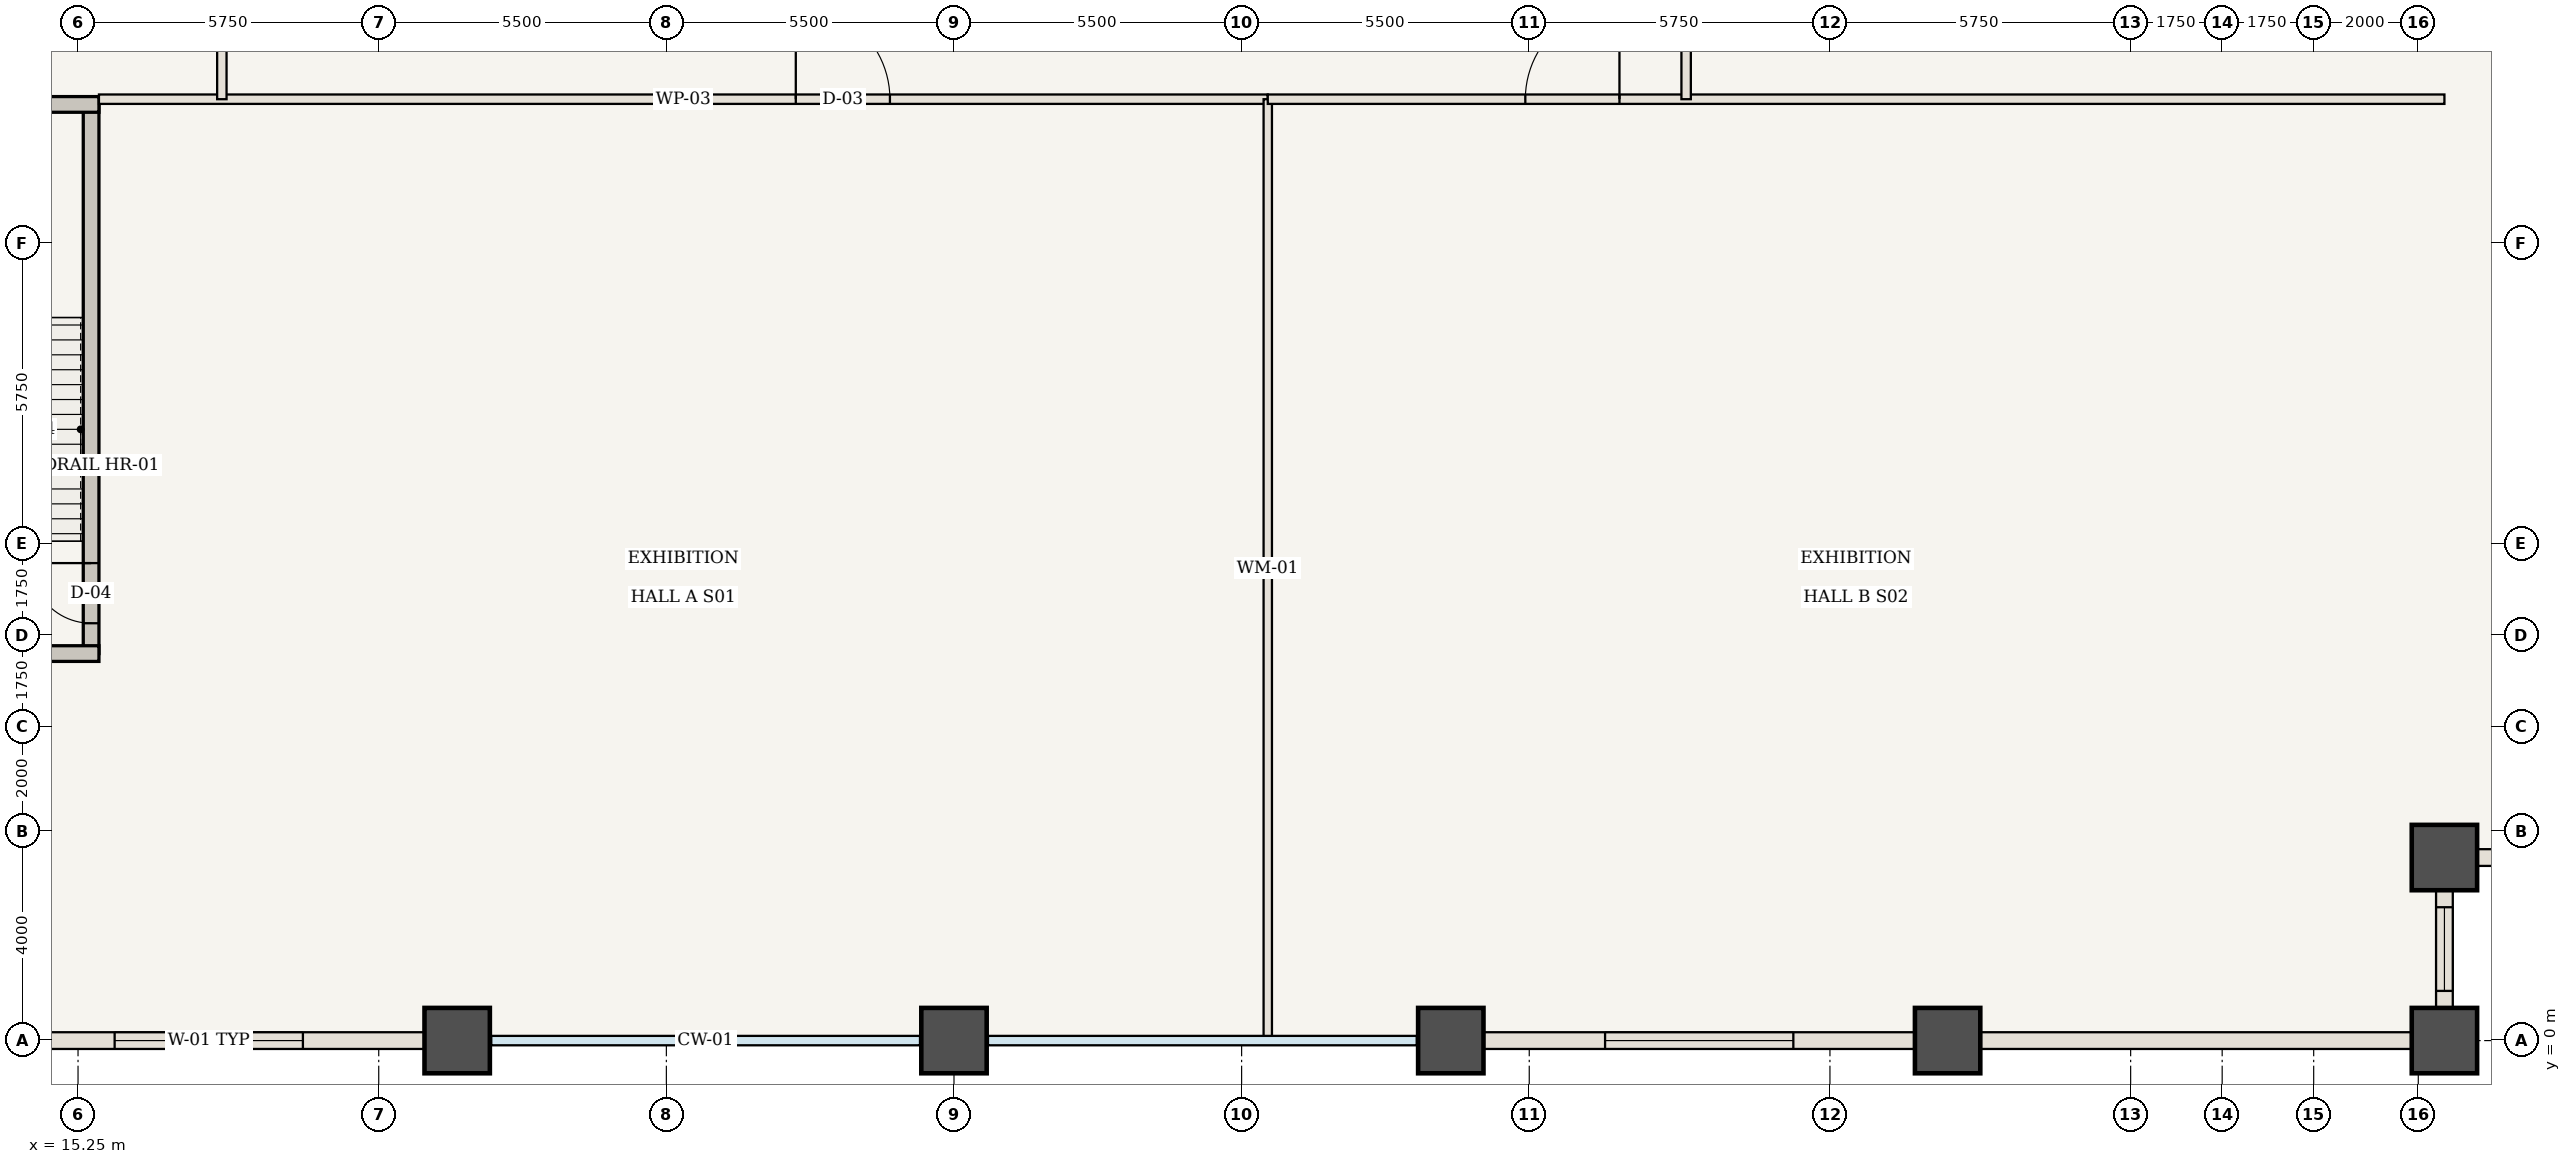
"""IFC4 building model, lengths in metres.
Left out: names, types, materials, properties, quantities, classifications, styles, units other than length and angle.
Written with IfcOpenShell. Run it as: python <this file> out.ifc"""

import sys

from ifc_helpers import new_model, si_unit, direction, frame, frame_2d, origin, origin_2d, place, context, subcontext, project, spatial, rectangle, extrude, element, fill, save


model = new_model("IFC4")
c1 = context("Model", 3, precision=1e-05, world=origin(), true_north=direction((0.0, 1.0)))
c2 = subcontext(c1, "Body", "Model", "MODEL_VIEW")
j1 = project(units=[si_unit("LENGTHUNIT", "METRE"), si_unit("PLANEANGLEUNIT", "RADIAN")], contexts=[c1])
p1 = place(None, origin())
s1 = spatial("IfcSite", under=j1, at=p1, CompositionType="ELEMENT")
p2 = place(p1, origin())
s2 = spatial("IfcBuilding", under=s1, at=p2, CompositionType="ELEMENT")
p3 = place(p2, frame((0.0, 0.0, 6.65)))
s3 = spatial("IfcBuildingStorey", under=s2, at=p3, CompositionType="ELEMENT", Elevation=6.65)
for number, where, z_axis, x_axis in (
    (1, (60.5, 0.0, 0.0), (0.0, 0.0, 1.0), (1.0, 0.0, 0.0)),
    (2, (60.5, 3.5, 0.0), (0.0, 0.0, 1.0), (1.0, 0.0, 0.0)),
    (3, (22.5, 0.0, 0.0), (0.0, 0.0, 1.0), (1.0, 0.0, 0.0)),
    (4, (32.0, 0.0, 0.0), (0.0, 0.0, 1.0), (1.0, 0.0, 0.0)),
    (5, (41.5, 0.0, 0.0), (0.0, 0.0, 1.0), (1.0, 0.0, 0.0)),
    (6, (51.0, 0.0, 0.0), (0.0, 0.0, 1.0), (1.0, 0.0, 0.0)),
):
    element("IfcColumn", number, at=place(p3, frame(where, z_axis=z_axis, x_axis=x_axis)), inside=s3, PredefinedType="COLUMN", context=c2, shape_type="SweptSolid", body=[
        extrude(rectangle(XDim=1.25, YDim=1.25, at=origin_2d()), origin(), (0.0, 0.0, 1.0), 5.6),
    ])
p4 = place(p3, frame((15.5, 7.4, 0.0), z_axis=(0.0, 0.0, 1.0), x_axis=(0.0, 1.0, 0.0)))
e7 = element("IfcWall", 7, at=p4, inside=s3, PredefinedType="SHEAR", context=c2, shape_type="SweptSolid", body=[
    extrude(rectangle(XDim=10.5, YDim=0.3, at=frame_2d((5.25, 0.0))), origin(), (0.0, 0.0, 1.0), 5.36),
])
p5 = place(p4, frame((0.58, 0.0, 0.0)))
e8 = element("IfcOpeningElement", 8, at=p5, cuts=e7, PredefinedType="OPENING", context=c2, shape_type="SweptSolid", body=[
    extrude(rectangle(XDim=1.15, YDim=2.15, at=frame_2d((0.575, 1.075))), frame((0.0, 0.16, 0.0), z_axis=(0.0, -1.0, 0.0), x_axis=(1.0, 0.0, 0.0)), (0.0, 0.0, 1.0), 0.32),
])
for number, where, z_axis, x_axis in (
    (9, (10.9, 7.4, 0.0), (0.0, 0.0, 1.0), (1.0, 0.0, 0.0)),
    (10, (10.9, 17.9, 0.0), (0.0, 0.0, 1.0), (1.0, 0.0, 0.0)),
):
    element("IfcWall", number, at=place(p3, frame(where, z_axis=z_axis, x_axis=x_axis)), inside=s3, PredefinedType="SHEAR", context=c2, shape_type="SweptSolid", body=[
        extrude(rectangle(XDim=4.75, YDim=0.3, at=frame_2d((2.375, 0.0))), origin(), (0.0, 0.0, 1.0), 5.36),
    ])
p6 = place(p3, frame((15.65, 18.0, 0.0), z_axis=(0.0, 0.0, 1.0), x_axis=(1.0, 0.0, 0.0)))
e11 = element("IfcWall", 11, at=p6, inside=s3, PredefinedType="STANDARD", context=c2, shape_type="SweptSolid", body=[
    extrude(rectangle(XDim=22.35, YDim=0.18, at=frame_2d((11.175, 0.0))), origin(), (0.0, 0.0, 1.0), 5.36),
])
p7 = place(p6, frame((13.325, 0.0, 0.0)))
e12 = element("IfcOpeningElement", 12, at=p7, cuts=e11, PredefinedType="OPENING", context=c2, shape_type="SweptSolid", body=[
    extrude(rectangle(XDim=1.8, YDim=2.35, at=frame_2d((0.9, 1.175))), frame((0.0, 0.1, 0.0), z_axis=(0.0, -1.0, 0.0), x_axis=(1.0, 0.0, 0.0)), (0.0, 0.0, 1.0), 0.2),
])
p8 = place(p3, frame((38.0, 0.06, 0.0), z_axis=(0.0, 0.0, 1.0), x_axis=(0.0, 1.0, 0.0)))
e13 = element("IfcWall", 13, at=p8, inside=s3, PredefinedType="MOVABLE", context=c2, shape_type="SweptSolid", body=[
    extrude(rectangle(XDim=17.94, YDim=0.16, at=frame_2d((8.97, 0.0))), origin(), (0.0, 0.0, 1.0), 5.36),
])
p9 = place(p3, frame((38.0, 18.0, 0.0), z_axis=(0.0, 0.0, 1.0), x_axis=(1.0, 0.0, 0.0)))
e14 = element("IfcWall", 14, at=p9, inside=s3, PredefinedType="STANDARD", context=c2, shape_type="SweptSolid", body=[
    extrude(rectangle(XDim=22.5, YDim=0.18, at=frame_2d((11.25, 0.0))), origin(), (0.0, 0.0, 1.0), 5.36),
])
p10 = place(p9, frame((4.925, 0.0, 0.0)))
e15 = element("IfcOpeningElement", 15, at=p10, cuts=e14, PredefinedType="OPENING", context=c2, shape_type="SweptSolid", body=[
    extrude(rectangle(XDim=1.8, YDim=2.35, at=frame_2d((0.9, 1.175))), frame((0.0, 0.1, 0.0), z_axis=(0.0, -1.0, 0.0), x_axis=(1.0, 0.0, 0.0)), (0.0, 0.0, 1.0), 0.2),
])
p11 = place(p3, frame((18.0, 18.0, 0.0), z_axis=(0.0, 0.0, 1.0), x_axis=(0.0, 1.0, 0.0)))
e16 = element("IfcWall", 16, at=p11, inside=s3, PredefinedType="STANDARD", context=c2, shape_type="SweptSolid", body=[
    extrude(rectangle(XDim=13.2, YDim=0.18, at=frame_2d((6.6, 0.0))), origin(), (0.0, 0.0, 1.0), 5.36),
])
p12 = place(p11, frame((6.1, 0.0, 0.0)))
e17 = element("IfcOpeningElement", 17, at=p12, cuts=e16, PredefinedType="OPENING", context=c2, shape_type="SweptSolid", body=[
    extrude(rectangle(XDim=0.95, YDim=2.15, at=frame_2d((0.475, 1.075))), frame((0.0, 0.1, 0.0), z_axis=(0.0, -1.0, 0.0), x_axis=(1.0, 0.0, 0.0)), (0.0, 0.0, 1.0), 0.2),
])
p13 = place(p3, frame((46.0, 18.0, 0.0), z_axis=(0.0, 0.0, 1.0), x_axis=(0.0, 1.0, 0.0)))
e18 = element("IfcWall", 18, at=p13, inside=s3, PredefinedType="STANDARD", context=c2, shape_type="SweptSolid", body=[
    extrude(rectangle(XDim=14.8, YDim=0.18, at=frame_2d((7.4, 0.0))), origin(), (0.0, 0.0, 1.0), 5.36),
])
p14 = place(p13, frame((6.9, 0.0, 0.0)))
e19 = element("IfcOpeningElement", 19, at=p14, cuts=e18, PredefinedType="OPENING", context=c2, shape_type="SweptSolid", body=[
    extrude(rectangle(XDim=0.95, YDim=2.15, at=frame_2d((0.475, 1.075))), frame((0.0, 0.1, 0.0), z_axis=(0.0, -1.0, 0.0), x_axis=(1.0, 0.0, 0.0)), (0.0, 0.0, 1.0), 0.2),
])
p15 = place(p3, frame((22.5, 0.0, 0.0), z_axis=(0.0, 0.0, 1.0), x_axis=(-1.0, 0.0, 0.0)))
e20 = element("IfcWall", 20, at=p15, inside=s3, PredefinedType="USERDEFINED", context=c2, shape_type="SweptSolid", body=[
    extrude(rectangle(XDim=9.5, YDim=0.32, at=frame_2d((4.75, 0.0))), origin(), (0.0, 0.0, 1.0), 4.46),
])
p16 = place(p15, frame((2.95, 0.0, 0.85)))
e21 = element("IfcOpeningElement", 21, at=p16, cuts=e20, PredefinedType="OPENING", context=c2, shape_type="SweptSolid", body=[
    extrude(rectangle(XDim=3.6, YDim=2.6, at=frame_2d((1.8, 1.3))), frame((0.0, 0.17, 0.0), z_axis=(0.0, -1.0, 0.0), x_axis=(1.0, 0.0, 0.0)), (0.0, 0.0, 1.0), 0.34),
])
p17 = place(p3, frame((51.0, 0.0, 0.0), z_axis=(0.0, 0.0, 1.0), x_axis=(-1.0, 0.0, 0.0)))
e22 = element("IfcWall", 22, at=p17, inside=s3, PredefinedType="USERDEFINED", context=c2, shape_type="SweptSolid", body=[
    extrude(rectangle(XDim=9.5, YDim=0.32, at=frame_2d((4.75, 0.0))), origin(), (0.0, 0.0, 1.0), 4.46),
])
p18 = place(p17, frame((2.95, 0.0, 0.85)))
e23 = element("IfcOpeningElement", 23, at=p18, cuts=e22, PredefinedType="OPENING", context=c2, shape_type="SweptSolid", body=[
    extrude(rectangle(XDim=3.6, YDim=2.6, at=frame_2d((1.8, 1.3))), frame((0.0, 0.17, 0.0), z_axis=(0.0, -1.0, 0.0), x_axis=(1.0, 0.0, 0.0)), (0.0, 0.0, 1.0), 0.34),
])
p19 = place(p3, frame((60.5, 0.0, 0.0), z_axis=(0.0, 0.0, 1.0), x_axis=(-1.0, 0.0, 0.0)))
e24 = element("IfcWall", 24, at=p19, inside=s3, PredefinedType="USERDEFINED", context=c2, shape_type="SweptSolid", body=[
    extrude(rectangle(XDim=9.5, YDim=0.32, at=frame_2d((4.75, 0.0))), origin(), (0.0, 0.0, 1.0), 4.46),
])
p20 = place(p3, frame((60.5, 3.5, 0.0), z_axis=(0.0, 0.0, 1.0), x_axis=(0.0, -1.0, 0.0)))
e25 = element("IfcWall", 25, at=p20, inside=s3, PredefinedType="USERDEFINED", context=c2, shape_type="SweptSolid", body=[
    extrude(rectangle(XDim=3.5, YDim=0.32, at=frame_2d((1.75, 0.0))), origin(), (0.0, 0.0, 1.0), 4.46),
])
p21 = place(p20, frame((0.95, 0.0, 0.85)))
e26 = element("IfcOpeningElement", 26, at=p21, cuts=e25, PredefinedType="OPENING", context=c2, shape_type="SweptSolid", body=[
    extrude(rectangle(XDim=1.6, YDim=2.05, at=frame_2d((0.8, 1.025))), frame((0.0, 0.17, 0.0), z_axis=(0.0, -1.0, 0.0), x_axis=(1.0, 0.0, 0.0)), (0.0, 0.0, 1.0), 0.34),
])
p22 = place(p3, frame((64.0, 3.5, 0.0), z_axis=(0.0, 0.0, 1.0), x_axis=(-1.0, 0.0, 0.0)))
e27 = element("IfcWall", 27, at=p22, inside=s3, PredefinedType="USERDEFINED", context=c2, shape_type="SweptSolid", body=[
    extrude(rectangle(XDim=3.5, YDim=0.32, at=frame_2d((1.75, 0.0))), origin(), (0.0, 0.0, 1.0), 4.46),
])
p23 = place(p22, frame((0.95, 0.0, 0.85)))
e28 = element("IfcOpeningElement", 28, at=p23, cuts=e27, PredefinedType="OPENING", context=c2, shape_type="SweptSolid", body=[
    extrude(rectangle(XDim=1.6, YDim=2.05, at=frame_2d((0.8, 1.025))), frame((0.0, 0.17, 0.0), z_axis=(0.0, -1.0, 0.0), x_axis=(1.0, 0.0, 0.0)), (0.0, 0.0, 1.0), 0.34),
])
p24 = place(p5, origin())
e29 = element("IfcDoor", 29, at=p24, inside=s3, OperationType="SINGLE_SWING_RIGHT", PredefinedType="DOOR", context=c2, shape_type="SweptSolid", body=[
    extrude(rectangle(XDim=1.15, YDim=2.15, at=frame_2d((0.575, 1.075))), frame((0.0, 0.025, 0.0), z_axis=(0.0, -1.0, 0.0), x_axis=(1.0, 0.0, 0.0)), (0.0, 0.0, 1.0), 0.05),
])
fill(e8, e29)
p25 = place(p7, origin())
e30 = element("IfcDoor", 30, at=p25, inside=s3, OperationType="SINGLE_SWING_LEFT", PredefinedType="DOOR", context=c2, shape_type="SweptSolid", body=[
    extrude(rectangle(XDim=1.8, YDim=2.35, at=frame_2d((0.9, 1.175))), frame((0.0, 0.025, 0.0), z_axis=(0.0, -1.0, 0.0), x_axis=(1.0, 0.0, 0.0)), (0.0, 0.0, 1.0), 0.05),
])
fill(e12, e30)
p26 = place(p10, origin())
e31 = element("IfcDoor", 31, at=p26, inside=s3, OperationType="SINGLE_SWING_RIGHT", PredefinedType="DOOR", context=c2, shape_type="SweptSolid", body=[
    extrude(rectangle(XDim=1.8, YDim=2.35, at=frame_2d((0.9, 1.175))), frame((0.0, 0.025, 0.0), z_axis=(0.0, -1.0, 0.0), x_axis=(1.0, 0.0, 0.0)), (0.0, 0.0, 1.0), 0.05),
])
fill(e15, e31)
p27 = place(p16, origin())
e32 = element("IfcWindow", 32, at=p27, inside=s3, PartitioningType="SINGLE_PANEL", PredefinedType="WINDOW", context=c2, shape_type="SweptSolid", body=[
    extrude(rectangle(XDim=3.6, YDim=2.6, at=frame_2d((1.8, 1.3))), frame((0.0, 0.03, 0.0), z_axis=(0.0, -1.0, 0.0), x_axis=(1.0, 0.0, 0.0)), (0.0, 0.0, 1.0), 0.06),
])
fill(e21, e32)
p28 = place(p18, origin())
e33 = element("IfcWindow", 33, at=p28, inside=s3, PartitioningType="SINGLE_PANEL", PredefinedType="WINDOW", context=c2, shape_type="SweptSolid", body=[
    extrude(rectangle(XDim=3.6, YDim=2.6, at=frame_2d((1.8, 1.3))), frame((0.0, 0.03, 0.0), z_axis=(0.0, -1.0, 0.0), x_axis=(1.0, 0.0, 0.0)), (0.0, 0.0, 1.0), 0.06),
])
fill(e23, e33)
p29 = place(p21, origin())
e34 = element("IfcWindow", 34, at=p29, inside=s3, PartitioningType="SINGLE_PANEL", PredefinedType="WINDOW", context=c2, shape_type="SweptSolid", body=[
    extrude(rectangle(XDim=1.6, YDim=2.05, at=frame_2d((0.8, 1.025))), frame((0.0, 0.03, 0.0), z_axis=(0.0, -1.0, 0.0), x_axis=(1.0, 0.0, 0.0)), (0.0, 0.0, 1.0), 0.06),
])
fill(e26, e34)
save(model, sys.argv[1])
